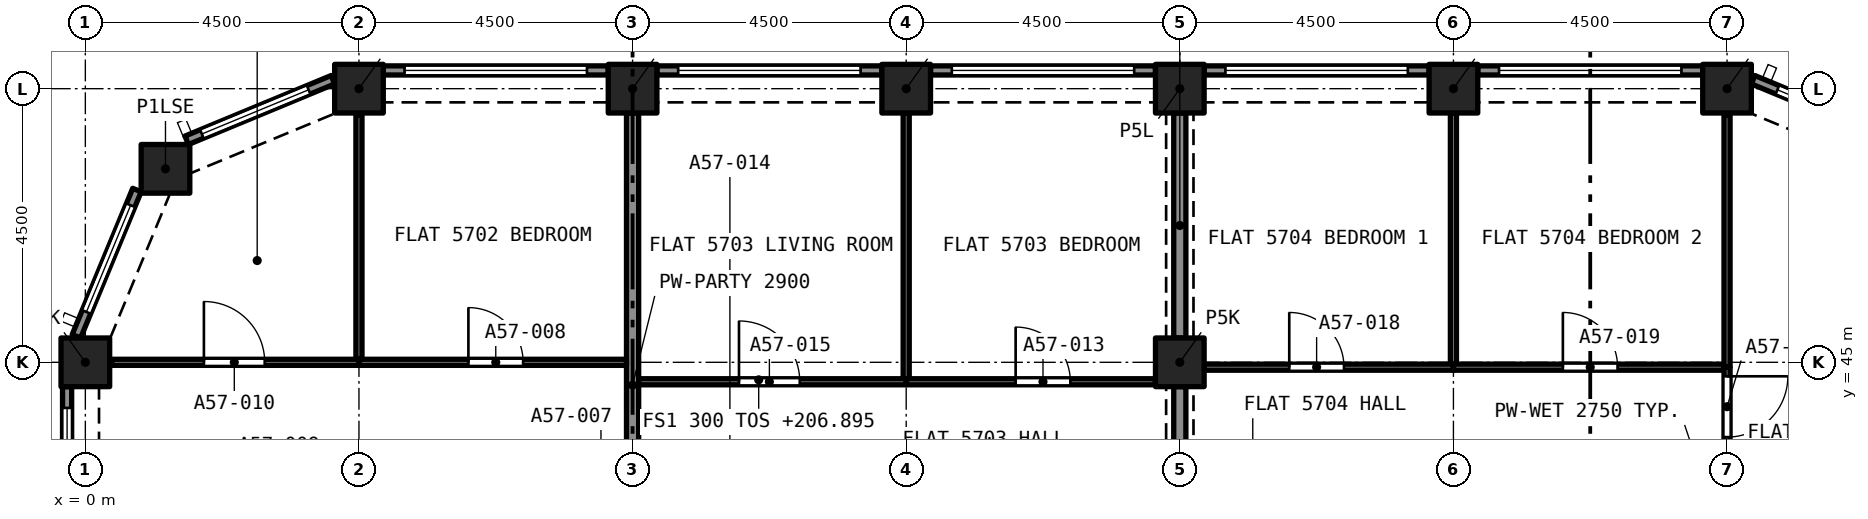
"""IFC4 building model, lengths in metres.
Left out: names, types, materials, properties, quantities, classifications, styles, units other than length and angle.
Written with IfcOpenShell. Run it as: python <this file> out.ifc"""

import sys

from ifc_helpers import new_model, si_unit, direction, frame, frame_2d, origin, origin_2d, place, context, subcontext, project, spatial, rectangle, extrude, element, fill, save


model = new_model("IFC4")
c1 = context("Model", 3, precision=1e-05, world=origin(), true_north=direction((0.0, 1.0)))
c2 = subcontext(c1, "Body", "Model", "MODEL_VIEW")
j1 = project(units=[si_unit("LENGTHUNIT", "METRE"), si_unit("PLANEANGLEUNIT", "RADIAN")], contexts=[c1])
p1 = place(None, origin())
s1 = spatial("IfcSite", under=j1, at=p1, CompositionType="ELEMENT")
p2 = place(p1, origin())
s2 = spatial("IfcBuilding", under=s1, at=p2, CompositionType="ELEMENT")
p3 = place(p2, frame((0.0, 0.0, 206.895)))
s3 = spatial("IfcBuildingStorey", under=s2, at=p3, CompositionType="ELEMENT", Elevation=206.895)
for number, where, z_axis, x_axis in (
    (1, (0.0, 45.0, 0.0), (0.0, 0.0, 1.0), (1.0, 0.0, 0.0)),
    (2, (18.0, 45.0, 0.0), (0.0, 0.0, 1.0), (1.0, 0.0, 0.0)),
    (3, (1.318, 48.182, 0.0), (0.0, 0.0, 1.0), (1.0, 0.0, 0.0)),
    (4, (4.5, 49.5, 0.0), (0.0, 0.0, 1.0), (1.0, 0.0, 0.0)),
    (5, (9.0, 49.5, 0.0), (0.0, 0.0, 1.0), (1.0, 0.0, 0.0)),
    (6, (13.5, 49.5, 0.0), (0.0, 0.0, 1.0), (1.0, 0.0, 0.0)),
    (7, (18.0, 49.5, 0.0), (0.0, 0.0, 1.0), (1.0, 0.0, 0.0)),
    (8, (22.5, 49.5, 0.0), (0.0, 0.0, 1.0), (1.0, 0.0, 0.0)),
    (9, (27.0, 49.5, 0.0), (0.0, 0.0, 1.0), (1.0, 0.0, 0.0)),
):
    element("IfcColumn", number, at=place(p3, frame(where, z_axis=z_axis, x_axis=x_axis)), inside=s3, PredefinedType="COLUMN", context=c2, shape_type="SweptSolid", body=[
        extrude(rectangle(XDim=0.8, YDim=0.8, at=origin_2d()), origin(), (0.0, 0.0, 1.0), 3.2),
    ])
p4 = place(p3, frame((27.429, 49.647, 0.0), z_axis=(0.0, 0.0, 1.0), x_axis=(0.923885342263, -0.382669406082, 0.0)))
e10 = element("IfcWall", 10, at=p4, inside=s3, PredefinedType="SOLIDWALL", context=c2, shape_type="SweptSolid", body=[
    extrude(rectangle(XDim=2.602, YDim=0.15, at=frame_2d((1.301, 0.0))), origin(), (0.0, 0.0, 1.0), 3.2),
])
p5 = place(p4, frame((0.432, 0.0, 0.45)))
e11 = element("IfcOpeningElement", 11, at=p5, cuts=e10, PredefinedType="OPENING", context=c2, shape_type="SweptSolid", body=[
    extrude(rectangle(XDim=1.9, YDim=1.95, at=frame_2d((0.95, 0.975))), frame((0.0, 0.085, 0.0), z_axis=(0.0, -1.0, 0.0), x_axis=(1.0, 0.0, 0.0)), (0.0, 0.0, 1.0), 0.17),
])
p6 = place(p3, frame((22.9, 49.8, 0.0), z_axis=(0.0, 0.0, 1.0), x_axis=(1.0, 0.0, 0.0)))
e12 = element("IfcWall", 12, at=p6, inside=s3, PredefinedType="SOLIDWALL", context=c2, shape_type="SweptSolid", body=[
    extrude(rectangle(XDim=3.7, YDim=0.15, at=frame_2d((1.85, 0.0))), origin(), (0.0, 0.0, 1.0), 3.2),
])
p7 = place(p6, frame((0.35, 0.0, 0.45)))
e13 = element("IfcOpeningElement", 13, at=p7, cuts=e12, PredefinedType="OPENING", context=c2, shape_type="SweptSolid", body=[
    extrude(rectangle(XDim=3.0, YDim=1.95, at=frame_2d((1.5, 0.975))), frame((0.0, 0.085, 0.0), z_axis=(0.0, -1.0, 0.0), x_axis=(1.0, 0.0, 0.0)), (0.0, 0.0, 1.0), 0.17),
])
p8 = place(p3, frame((18.4, 49.8, 0.0), z_axis=(0.0, 0.0, 1.0), x_axis=(1.0, 0.0, 0.0)))
e14 = element("IfcWall", 14, at=p8, inside=s3, PredefinedType="SOLIDWALL", context=c2, shape_type="SweptSolid", body=[
    extrude(rectangle(XDim=3.7, YDim=0.15, at=frame_2d((1.85, 0.0))), origin(), (0.0, 0.0, 1.0), 3.2),
])
p9 = place(p8, frame((0.35, 0.0, 0.45)))
e15 = element("IfcOpeningElement", 15, at=p9, cuts=e14, PredefinedType="OPENING", context=c2, shape_type="SweptSolid", body=[
    extrude(rectangle(XDim=3.0, YDim=1.95, at=frame_2d((1.5, 0.975))), frame((0.0, 0.085, 0.0), z_axis=(0.0, -1.0, 0.0), x_axis=(1.0, 0.0, 0.0)), (0.0, 0.0, 1.0), 0.17),
])
p10 = place(p3, frame((13.9, 49.8, 0.0), z_axis=(0.0, 0.0, 1.0), x_axis=(1.0, 0.0, 0.0)))
e16 = element("IfcWall", 16, at=p10, inside=s3, PredefinedType="SOLIDWALL", context=c2, shape_type="SweptSolid", body=[
    extrude(rectangle(XDim=3.7, YDim=0.15, at=frame_2d((1.85, 0.0))), origin(), (0.0, 0.0, 1.0), 3.2),
])
p11 = place(p10, frame((0.35, 0.0, 0.45)))
e17 = element("IfcOpeningElement", 17, at=p11, cuts=e16, PredefinedType="OPENING", context=c2, shape_type="SweptSolid", body=[
    extrude(rectangle(XDim=3.0, YDim=1.95, at=frame_2d((1.5, 0.975))), frame((0.0, 0.085, 0.0), z_axis=(0.0, -1.0, 0.0), x_axis=(1.0, 0.0, 0.0)), (0.0, 0.0, 1.0), 0.17),
])
p12 = place(p3, frame((9.4, 49.8, 0.0), z_axis=(0.0, 0.0, 1.0), x_axis=(1.0, 0.0, 0.0)))
e18 = element("IfcWall", 18, at=p12, inside=s3, PredefinedType="SOLIDWALL", context=c2, shape_type="SweptSolid", body=[
    extrude(rectangle(XDim=3.7, YDim=0.15, at=frame_2d((1.85, 0.0))), origin(), (0.0, 0.0, 1.0), 3.2),
])
p13 = place(p12, frame((0.35, 0.0, 0.45)))
e19 = element("IfcOpeningElement", 19, at=p13, cuts=e18, PredefinedType="OPENING", context=c2, shape_type="SweptSolid", body=[
    extrude(rectangle(XDim=3.0, YDim=1.95, at=frame_2d((1.5, 0.975))), frame((0.0, 0.085, 0.0), z_axis=(0.0, -1.0, 0.0), x_axis=(1.0, 0.0, 0.0)), (0.0, 0.0, 1.0), 0.17),
])
p14 = place(p3, frame((4.9, 49.8, 0.0), z_axis=(0.0, 0.0, 1.0), x_axis=(1.0, 0.0, 0.0)))
e20 = element("IfcWall", 20, at=p14, inside=s3, PredefinedType="SOLIDWALL", context=c2, shape_type="SweptSolid", body=[
    extrude(rectangle(XDim=3.7, YDim=0.15, at=frame_2d((1.85, 0.0))), origin(), (0.0, 0.0, 1.0), 3.2),
])
p15 = place(p14, frame((0.35, 0.0, 0.45)))
e21 = element("IfcOpeningElement", 21, at=p15, cuts=e20, PredefinedType="OPENING", context=c2, shape_type="SweptSolid", body=[
    extrude(rectangle(XDim=3.0, YDim=1.95, at=frame_2d((1.5, 0.975))), frame((0.0, 0.085, 0.0), z_axis=(0.0, -1.0, 0.0), x_axis=(1.0, 0.0, 0.0)), (0.0, 0.0, 1.0), 0.17),
])
p16 = place(p3, frame((1.667, 48.651, 0.0), z_axis=(0.0, 0.0, 1.0), x_axis=(0.923885342263, 0.382669406082, 0.0)))
e22 = element("IfcWall", 22, at=p16, inside=s3, PredefinedType="SOLIDWALL", context=c2, shape_type="SweptSolid", body=[
    extrude(rectangle(XDim=2.602, YDim=0.15, at=frame_2d((1.301, 0.0))), origin(), (0.0, 0.0, 1.0), 3.2),
])
p17 = place(p16, frame((0.27, 0.0, 0.45)))
e23 = element("IfcOpeningElement", 23, at=p17, cuts=e22, PredefinedType="OPENING", context=c2, shape_type="SweptSolid", body=[
    extrude(rectangle(XDim=1.9, YDim=1.95, at=frame_2d((0.95, 0.975))), frame((0.0, 0.085, 0.0), z_axis=(0.0, -1.0, 0.0), x_axis=(1.0, 0.0, 0.0)), (0.0, 0.0, 1.0), 0.17),
])
p18 = place(p3, frame((-0.147, 45.429, 0.0), z_axis=(0.0, 0.0, 1.0), x_axis=(0.382669406082, 0.923885342263, 0.0)))
e24 = element("IfcWall", 24, at=p18, inside=s3, PredefinedType="SOLIDWALL", context=c2, shape_type="SweptSolid", body=[
    extrude(rectangle(XDim=2.602, YDim=0.15, at=frame_2d((1.301, 0.0))), origin(), (0.0, 0.0, 1.0), 3.2),
])
p19 = place(p18, frame((0.432, 0.0, 0.45)))
e25 = element("IfcOpeningElement", 25, at=p19, cuts=e24, PredefinedType="OPENING", context=c2, shape_type="SweptSolid", body=[
    extrude(rectangle(XDim=1.9, YDim=1.95, at=frame_2d((0.95, 0.975))), frame((0.0, 0.085, 0.0), z_axis=(0.0, -1.0, 0.0), x_axis=(1.0, 0.0, 0.0)), (0.0, 0.0, 1.0), 0.17),
])
p20 = place(p3, frame((-0.3, 40.9, 0.0), z_axis=(0.0, 0.0, 1.0), x_axis=(0.0, 1.0, 0.0)))
e26 = element("IfcWall", 26, at=p20, inside=s3, PredefinedType="SOLIDWALL", context=c2, shape_type="SweptSolid", body=[
    extrude(rectangle(XDim=3.7, YDim=0.15, at=frame_2d((1.85, 0.0))), origin(), (0.0, 0.0, 1.0), 3.2),
])
p21 = place(p20, frame((0.35, 0.0, 0.45)))
e27 = element("IfcOpeningElement", 27, at=p21, cuts=e26, PredefinedType="OPENING", context=c2, shape_type="SweptSolid", body=[
    extrude(rectangle(XDim=3.0, YDim=1.95, at=frame_2d((1.5, 0.975))), frame((0.0, 0.085, 0.0), z_axis=(0.0, -1.0, 0.0), x_axis=(1.0, 0.0, 0.0)), (0.0, 0.0, 1.0), 0.17),
])
p22 = place(p3, frame((9.0, 40.15, 0.0), z_axis=(0.0, 0.0, 1.0), x_axis=(0.0, 1.0, 0.0)))
e28 = element("IfcWall", 28, at=p22, inside=s3, PredefinedType="PARTITIONING", context=c2, shape_type="SweptSolid", body=[
    extrude(rectangle(XDim=8.95, YDim=0.2, at=frame_2d((4.475, 0.0))), origin(), (0.0, 0.0, 1.0), 2.9),
])
p23 = place(p3, frame((4.5, 45.0, 0.0), z_axis=(0.0, 0.0, 1.0), x_axis=(1.0, 0.0, 0.0)))
e29 = element("IfcWall", 29, at=p23, inside=s3, PredefinedType="PARTITIONING", context=c2, shape_type="SweptSolid", body=[
    extrude(rectangle(XDim=4.4, YDim=0.1, at=frame_2d((2.2, 0.0))), origin(), (0.0, 0.0, 1.0), 2.9),
])
p24 = place(p23, frame((1.8, 0.0, 0.0)))
e30 = element("IfcOpeningElement", 30, at=p24, cuts=e29, PredefinedType="OPENING", context=c2, shape_type="SweptSolid", body=[
    extrude(rectangle(XDim=0.9, YDim=2.1, at=frame_2d((0.45, 1.05))), frame((0.0, 0.06, 0.0), z_axis=(0.0, -1.0, 0.0), x_axis=(1.0, 0.0, 0.0)), (0.0, 0.0, 1.0), 0.12),
])
p25 = place(p3, frame((4.5, 45.05, 0.0), z_axis=(0.0, 0.0, 1.0), x_axis=(0.0, 1.0, 0.0)))
e31 = element("IfcWall", 31, at=p25, inside=s3, PredefinedType="PARTITIONING", context=c2, shape_type="SweptSolid", body=[
    extrude(rectangle(XDim=4.017, YDim=0.1, at=frame_2d((2.009, 0.0))), origin(), (0.0, 0.0, 1.0), 2.9),
])
p26 = place(p3, frame((0.433, 45.0, 0.0), z_axis=(0.0, 0.0, 1.0), x_axis=(1.0, 0.0, 0.0)))
e32 = element("IfcWall", 32, at=p26, inside=s3, PredefinedType="PARTITIONING", context=c2, shape_type="SweptSolid", body=[
    extrude(rectangle(XDim=4.067, YDim=0.1, at=frame_2d((2.034, 0.0))), origin(), (0.0, 0.0, 1.0), 2.9),
])
p27 = place(p26, frame((1.517, 0.0, 0.0)))
e33 = element("IfcOpeningElement", 33, at=p27, cuts=e32, PredefinedType="OPENING", context=c2, shape_type="SweptSolid", body=[
    extrude(rectangle(XDim=1.0, YDim=2.1, at=frame_2d((0.5, 1.05))), frame((0.0, 0.06, 0.0), z_axis=(0.0, -1.0, 0.0), x_axis=(1.0, 0.0, 0.0)), (0.0, 0.0, 1.0), 0.12),
])
p28 = place(p3, frame((13.5, 44.68, 0.0), z_axis=(0.0, 0.0, 1.0), x_axis=(1.0, 0.0, 0.0)))
e34 = element("IfcWall", 34, at=p28, inside=s3, PredefinedType="PARTITIONING", context=c2, shape_type="SweptSolid", body=[
    extrude(rectangle(XDim=4.1, YDim=0.1, at=frame_2d((2.05, 0.0))), origin(), (0.0, 0.0, 1.0), 2.9),
])
p29 = place(p28, frame((1.8, 0.0, 0.0)))
e35 = element("IfcOpeningElement", 35, at=p29, cuts=e34, PredefinedType="OPENING", context=c2, shape_type="SweptSolid", body=[
    extrude(rectangle(XDim=0.9, YDim=2.1, at=frame_2d((0.45, 1.05))), frame((0.0, 0.06, 0.0), z_axis=(0.0, -1.0, 0.0), x_axis=(1.0, 0.0, 0.0)), (0.0, 0.0, 1.0), 0.12),
])
p30 = place(p3, frame((13.5, 44.73, 0.0), z_axis=(0.0, 0.0, 1.0), x_axis=(0.0, 1.0, 0.0)))
e36 = element("IfcWall", 36, at=p30, inside=s3, PredefinedType="PARTITIONING", context=c2, shape_type="SweptSolid", body=[
    extrude(rectangle(XDim=4.37, YDim=0.1, at=frame_2d((2.185, 0.0))), origin(), (0.0, 0.0, 1.0), 2.9),
])
p31 = place(p3, frame((18.0, 45.4, 0.0), z_axis=(0.0, 0.0, 1.0), x_axis=(0.0, 1.0, 0.0)))
e37 = element("IfcWall", 37, at=p31, inside=s3, PredefinedType="PARTITIONING", context=c2, shape_type="SweptSolid", body=[
    extrude(rectangle(XDim=3.7, YDim=0.2, at=frame_2d((1.85, 0.0))), origin(), (0.0, 0.0, 1.0), 2.38),
])
p32 = place(p3, frame((9.1, 44.68, 0.0), z_axis=(0.0, 0.0, 1.0), x_axis=(1.0, 0.0, 0.0)))
e38 = element("IfcWall", 38, at=p32, inside=s3, PredefinedType="PARTITIONING", context=c2, shape_type="SweptSolid", body=[
    extrude(rectangle(XDim=4.4, YDim=0.1, at=frame_2d((2.2, 0.0))), origin(), (0.0, 0.0, 1.0), 2.9),
])
p33 = place(p32, frame((1.65, 0.0, 0.0)))
e39 = element("IfcOpeningElement", 39, at=p33, cuts=e38, PredefinedType="OPENING", context=c2, shape_type="SweptSolid", body=[
    extrude(rectangle(XDim=1.0, YDim=2.1, at=frame_2d((0.5, 1.05))), frame((0.0, 0.06, 0.0), z_axis=(0.0, -1.0, 0.0), x_axis=(1.0, 0.0, 0.0)), (0.0, 0.0, 1.0), 0.12),
])
p34 = place(p3, frame((18.0, 40.9, 0.0), z_axis=(0.0, 0.0, 1.0), x_axis=(0.0, 1.0, 0.0)))
e40 = element("IfcWall", 40, at=p34, inside=s3, PredefinedType="PARTITIONING", context=c2, shape_type="SweptSolid", body=[
    extrude(rectangle(XDim=3.7, YDim=0.2, at=frame_2d((1.85, 0.0))), origin(), (0.0, 0.0, 1.0), 2.38),
])
p35 = place(p3, frame((22.5, 44.97, 0.0), z_axis=(0.0, 0.0, 1.0), x_axis=(0.0, 1.0, 0.0)))
e41 = element("IfcWall", 41, at=p35, inside=s3, PredefinedType="PARTITIONING", context=c2, shape_type="SweptSolid", body=[
    extrude(rectangle(XDim=4.13, YDim=0.1, at=frame_2d((2.065, 0.0))), origin(), (0.0, 0.0, 1.0), 2.75),
])
p36 = place(p3, frame((18.4, 44.92, 0.0), z_axis=(0.0, 0.0, 1.0), x_axis=(1.0, 0.0, 0.0)))
e42 = element("IfcWall", 42, at=p36, inside=s3, PredefinedType="PARTITIONING", context=c2, shape_type="SweptSolid", body=[
    extrude(rectangle(XDim=4.1, YDim=0.1, at=frame_2d((2.05, 0.0))), origin(), (0.0, 0.0, 1.0), 2.75),
])
p37 = place(p36, frame((1.4, 0.0, 0.0)))
e43 = element("IfcOpeningElement", 43, at=p37, cuts=e42, PredefinedType="OPENING", context=c2, shape_type="SweptSolid", body=[
    extrude(rectangle(XDim=0.9, YDim=2.1, at=frame_2d((0.45, 1.05))), frame((0.0, 0.06, 0.0), z_axis=(0.0, -1.0, 0.0), x_axis=(1.0, 0.0, 0.0)), (0.0, 0.0, 1.0), 0.12),
])
p38 = place(p3, frame((22.5, 44.92, 0.0), z_axis=(0.0, 0.0, 1.0), x_axis=(1.0, 0.0, 0.0)))
e44 = element("IfcWall", 44, at=p38, inside=s3, PredefinedType="PARTITIONING", context=c2, shape_type="SweptSolid", body=[
    extrude(rectangle(XDim=4.45, YDim=0.1, at=frame_2d((2.225, 0.0))), origin(), (0.0, 0.0, 1.0), 2.75),
])
p39 = place(p38, frame((1.8, 0.0, 0.0)))
e45 = element("IfcOpeningElement", 45, at=p39, cuts=e44, PredefinedType="OPENING", context=c2, shape_type="SweptSolid", body=[
    extrude(rectangle(XDim=0.9, YDim=2.1, at=frame_2d((0.45, 1.05))), frame((0.0, 0.06, 0.0), z_axis=(0.0, -1.0, 0.0), x_axis=(1.0, 0.0, 0.0)), (0.0, 0.0, 1.0), 0.12),
])
p40 = place(p3, frame((27.0, 44.92, 0.0), z_axis=(0.0, 0.0, 1.0), x_axis=(0.0, 1.0, 0.0)))
e46 = element("IfcWall", 46, at=p40, inside=s3, PredefinedType="PARTITIONING", context=c2, shape_type="SweptSolid", body=[
    extrude(rectangle(XDim=4.147, YDim=0.1, at=frame_2d((2.074, 0.0))), origin(), (0.0, 0.0, 1.0), 2.75),
])
p41 = place(p3, frame((27.0, 44.92, 0.0), z_axis=(0.0, 0.0, 1.0), x_axis=(0.0, -1.0, 0.0)))
e47 = element("IfcWall", 47, at=p41, inside=s3, PredefinedType="PARTITIONING", context=c2, shape_type="SweptSolid", body=[
    extrude(rectangle(XDim=1.3, YDim=0.1, at=frame_2d((0.65, 0.0))), origin(), (0.0, 0.0, 1.0), 2.75),
])
p42 = place(p41, frame((0.15, 0.0, 0.0)))
e48 = element("IfcOpeningElement", 48, at=p42, cuts=e47, PredefinedType="OPENING", context=c2, shape_type="SweptSolid", body=[
    extrude(rectangle(XDim=1.0, YDim=2.1, at=frame_2d((0.5, 1.05))), frame((0.0, 0.06, 0.0), z_axis=(0.0, -1.0, 0.0), x_axis=(1.0, 0.0, 0.0)), (0.0, 0.0, 1.0), 0.12),
])
p43 = place(p5, origin())
e49 = element("IfcWindow", 49, at=p43, inside=s3, PartitioningType="SINGLE_PANEL", PredefinedType="WINDOW", context=c2, shape_type="SweptSolid", body=[
    extrude(rectangle(XDim=1.9, YDim=1.95, at=frame_2d((0.95, 0.975))), frame((0.0, 0.03, 0.0), z_axis=(0.0, -1.0, 0.0), x_axis=(1.0, 0.0, 0.0)), (0.0, 0.0, 1.0), 0.06),
])
fill(e11, e49)
p44 = place(p7, origin())
e50 = element("IfcWindow", 50, at=p44, inside=s3, PartitioningType="SINGLE_PANEL", PredefinedType="WINDOW", context=c2, shape_type="SweptSolid", body=[
    extrude(rectangle(XDim=3.0, YDim=1.95, at=frame_2d((1.5, 0.975))), frame((0.0, 0.03, 0.0), z_axis=(0.0, -1.0, 0.0), x_axis=(1.0, 0.0, 0.0)), (0.0, 0.0, 1.0), 0.06),
])
fill(e13, e50)
p45 = place(p9, origin())
e51 = element("IfcWindow", 51, at=p45, inside=s3, PartitioningType="SINGLE_PANEL", PredefinedType="WINDOW", context=c2, shape_type="SweptSolid", body=[
    extrude(rectangle(XDim=3.0, YDim=1.95, at=frame_2d((1.5, 0.975))), frame((0.0, 0.03, 0.0), z_axis=(0.0, -1.0, 0.0), x_axis=(1.0, 0.0, 0.0)), (0.0, 0.0, 1.0), 0.06),
])
fill(e15, e51)
p46 = place(p11, origin())
e52 = element("IfcWindow", 52, at=p46, inside=s3, PartitioningType="SINGLE_PANEL", PredefinedType="WINDOW", context=c2, shape_type="SweptSolid", body=[
    extrude(rectangle(XDim=3.0, YDim=1.95, at=frame_2d((1.5, 0.975))), frame((0.0, 0.03, 0.0), z_axis=(0.0, -1.0, 0.0), x_axis=(1.0, 0.0, 0.0)), (0.0, 0.0, 1.0), 0.06),
])
fill(e17, e52)
p47 = place(p13, origin())
e53 = element("IfcWindow", 53, at=p47, inside=s3, PartitioningType="SINGLE_PANEL", PredefinedType="WINDOW", context=c2, shape_type="SweptSolid", body=[
    extrude(rectangle(XDim=3.0, YDim=1.95, at=frame_2d((1.5, 0.975))), frame((0.0, 0.03, 0.0), z_axis=(0.0, -1.0, 0.0), x_axis=(1.0, 0.0, 0.0)), (0.0, 0.0, 1.0), 0.06),
])
fill(e19, e53)
p48 = place(p15, origin())
e54 = element("IfcWindow", 54, at=p48, inside=s3, PartitioningType="SINGLE_PANEL", PredefinedType="WINDOW", context=c2, shape_type="SweptSolid", body=[
    extrude(rectangle(XDim=3.0, YDim=1.95, at=frame_2d((1.5, 0.975))), frame((0.0, 0.03, 0.0), z_axis=(0.0, -1.0, 0.0), x_axis=(1.0, 0.0, 0.0)), (0.0, 0.0, 1.0), 0.06),
])
fill(e21, e54)
p49 = place(p17, origin())
e55 = element("IfcWindow", 55, at=p49, inside=s3, PartitioningType="SINGLE_PANEL", PredefinedType="WINDOW", context=c2, shape_type="SweptSolid", body=[
    extrude(rectangle(XDim=1.9, YDim=1.95, at=frame_2d((0.95, 0.975))), frame((0.0, 0.03, 0.0), z_axis=(0.0, -1.0, 0.0), x_axis=(1.0, 0.0, 0.0)), (0.0, 0.0, 1.0), 0.06),
])
fill(e23, e55)
p50 = place(p19, origin())
e56 = element("IfcWindow", 56, at=p50, inside=s3, PartitioningType="SINGLE_PANEL", PredefinedType="WINDOW", context=c2, shape_type="SweptSolid", body=[
    extrude(rectangle(XDim=1.9, YDim=1.95, at=frame_2d((0.95, 0.975))), frame((0.0, 0.03, 0.0), z_axis=(0.0, -1.0, 0.0), x_axis=(1.0, 0.0, 0.0)), (0.0, 0.0, 1.0), 0.06),
])
fill(e25, e56)
p51 = place(p21, origin())
e57 = element("IfcWindow", 57, at=p51, inside=s3, PartitioningType="SINGLE_PANEL", PredefinedType="WINDOW", context=c2, shape_type="SweptSolid", body=[
    extrude(rectangle(XDim=3.0, YDim=1.95, at=frame_2d((1.5, 0.975))), frame((0.0, 0.03, 0.0), z_axis=(0.0, -1.0, 0.0), x_axis=(1.0, 0.0, 0.0)), (0.0, 0.0, 1.0), 0.06),
])
fill(e27, e57)
p52 = place(p24, origin())
e58 = element("IfcDoor", 58, at=p52, inside=s3, OperationType="SINGLE_SWING_RIGHT", PredefinedType="DOOR", context=c2, shape_type="SweptSolid", body=[
    extrude(rectangle(XDim=0.9, YDim=2.1, at=frame_2d((0.45, 1.05))), frame((0.0, 0.025, 0.0), z_axis=(0.0, -1.0, 0.0), x_axis=(1.0, 0.0, 0.0)), (0.0, 0.0, 1.0), 0.05),
])
fill(e30, e58)
p53 = place(p27, origin())
e59 = element("IfcDoor", 59, at=p53, inside=s3, OperationType="SINGLE_SWING_LEFT", PredefinedType="DOOR", context=c2, shape_type="SweptSolid", body=[
    extrude(rectangle(XDim=1.0, YDim=2.1, at=frame_2d((0.5, 1.05))), frame((0.0, 0.025, 0.0), z_axis=(0.0, -1.0, 0.0), x_axis=(1.0, 0.0, 0.0)), (0.0, 0.0, 1.0), 0.05),
])
fill(e33, e59)
p54 = place(p29, origin())
e60 = element("IfcDoor", 60, at=p54, inside=s3, OperationType="SINGLE_SWING_RIGHT", PredefinedType="DOOR", context=c2, shape_type="SweptSolid", body=[
    extrude(rectangle(XDim=0.9, YDim=2.1, at=frame_2d((0.45, 1.05))), frame((0.0, 0.025, 0.0), z_axis=(0.0, -1.0, 0.0), x_axis=(1.0, 0.0, 0.0)), (0.0, 0.0, 1.0), 0.05),
])
fill(e35, e60)
p55 = place(p33, origin())
e61 = element("IfcDoor", 61, at=p55, inside=s3, OperationType="SINGLE_SWING_LEFT", PredefinedType="DOOR", context=c2, shape_type="SweptSolid", body=[
    extrude(rectangle(XDim=1.0, YDim=2.1, at=frame_2d((0.5, 1.05))), frame((0.0, 0.025, 0.0), z_axis=(0.0, -1.0, 0.0), x_axis=(1.0, 0.0, 0.0)), (0.0, 0.0, 1.0), 0.05),
])
fill(e39, e61)
p56 = place(p37, origin())
e62 = element("IfcDoor", 62, at=p56, inside=s3, OperationType="SINGLE_SWING_LEFT", PredefinedType="DOOR", context=c2, shape_type="SweptSolid", body=[
    extrude(rectangle(XDim=0.9, YDim=2.1, at=frame_2d((0.45, 1.05))), frame((0.0, 0.025, 0.0), z_axis=(0.0, -1.0, 0.0), x_axis=(1.0, 0.0, 0.0)), (0.0, 0.0, 1.0), 0.05),
])
fill(e43, e62)
p57 = place(p39, origin())
e63 = element("IfcDoor", 63, at=p57, inside=s3, OperationType="SINGLE_SWING_RIGHT", PredefinedType="DOOR", context=c2, shape_type="SweptSolid", body=[
    extrude(rectangle(XDim=0.9, YDim=2.1, at=frame_2d((0.45, 1.05))), frame((0.0, 0.025, 0.0), z_axis=(0.0, -1.0, 0.0), x_axis=(1.0, 0.0, 0.0)), (0.0, 0.0, 1.0), 0.05),
])
fill(e45, e63)
p58 = place(p42, origin())
e64 = element("IfcDoor", 64, at=p58, inside=s3, OperationType="SINGLE_SWING_LEFT", PredefinedType="DOOR", context=c2, shape_type="SweptSolid", body=[
    extrude(rectangle(XDim=1.0, YDim=2.1, at=frame_2d((0.5, 1.05))), frame((0.0, 0.025, 0.0), z_axis=(0.0, -1.0, 0.0), x_axis=(1.0, 0.0, 0.0)), (0.0, 0.0, 1.0), 0.05),
])
fill(e48, e64)
save(model, sys.argv[1])
